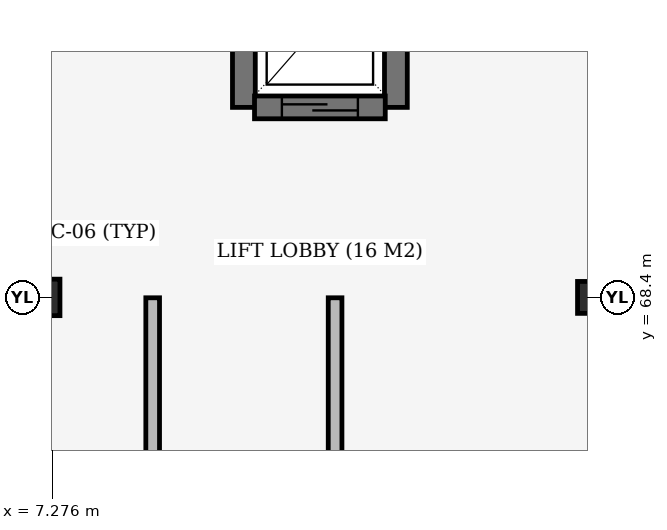
"""IFC4 building model, lengths in metres.
Left out: names, types, materials, properties, quantities, classifications, styles, units other than length and angle.
Written with IfcOpenShell. Run it as: python <this file> out.ifc"""

import sys

from ifc_helpers import new_model, si_unit, direction, frame, frame_2d, origin, origin_2d, place, context, subcontext, project, spatial, rectangle, extrude, element, fill, save


model = new_model("IFC4")
c1 = context("Model", 3, precision=1e-05, world=origin(), true_north=direction((0.0, 1.0)))
c2 = subcontext(c1, "Body", "Model", "MODEL_VIEW")
j1 = project(units=[si_unit("LENGTHUNIT", "METRE"), si_unit("PLANEANGLEUNIT", "RADIAN")], contexts=[c1])
p1 = place(None, origin())
s1 = spatial("IfcSite", under=j1, at=p1, CompositionType="ELEMENT")
p2 = place(p1, origin())
s2 = spatial("IfcBuilding", under=s1, at=p2, CompositionType="ELEMENT")
p3 = place(p2, frame((0.0, 0.0, 13.8)))
s3 = spatial("IfcBuildingStorey", under=s2, at=p3, CompositionType="ELEMENT", Elevation=13.8)
p4 = place(p3, frame((7.2, 68.4, 0.0), z_axis=(0.0, 0.0, 1.0), x_axis=(1.0, 0.0, 0.0)))
e1 = element("IfcColumn", 1, at=p4, inside=s3, PredefinedType="COLUMN", context=c2, shape_type="SweptSolid", body=[
    extrude(rectangle(XDim=0.36, YDim=0.48, at=origin_2d()), origin(), (0.0, 0.0, 1.0), 3.92),
])
p5 = place(p3, frame((14.4, 68.4, 0.0), z_axis=(0.0, 0.0, 1.0), x_axis=(1.0, 0.0, 0.0)))
e2 = element("IfcColumn", 2, at=p5, inside=s3, PredefinedType="COLUMN", context=c2, shape_type="SweptSolid", body=[
    extrude(rectangle(XDim=0.42, YDim=0.42, at=origin_2d()), origin(), (0.0, 0.0, 1.0), 3.92),
])
for number, where, z_axis, x_axis in (
    (3, (9.8, 73.1, 0.0), (0.0, 0.0, 1.0), (0.0, -1.0, 0.0)),
    (4, (11.8, 70.9, 0.0), (0.0, 0.0, 1.0), (0.0, 1.0, 0.0)),
):
    element("IfcWall", number, at=place(p3, frame(where, z_axis=z_axis, x_axis=x_axis)), inside=s3, PredefinedType="SHEAR", context=c2, shape_type="SweptSolid", body=[
        extrude(rectangle(XDim=2.2, YDim=0.3, at=frame_2d((1.1, 0.0))), origin(), (0.0, 0.0, 1.0), 3.92),
    ])
p6 = place(p3, frame((11.66, 70.9, 0.0), z_axis=(0.0, 0.0, 1.0), x_axis=(-1.0, 0.0, 0.0)))
e5 = element("IfcWall", 5, at=p6, inside=s3, PredefinedType="SHEAR", context=c2, shape_type="SweptSolid", body=[
    extrude(rectangle(XDim=1.72, YDim=0.3, at=frame_2d((0.86, 0.0))), origin(), (0.0, 0.0, 1.0), 3.92),
])
p7 = place(p6, frame((0.36, 0.0, 0.0)))
e6 = element("IfcOpeningElement", 6, at=p7, cuts=e5, PredefinedType="OPENING", context=c2, shape_type="SweptSolid", body=[
    extrude(rectangle(XDim=1.0, YDim=2.1, at=frame_2d((0.5, 1.05))), frame((0.0, 0.16, 0.0), z_axis=(0.0, -1.0, 0.0), x_axis=(1.0, 0.0, 0.0)), (0.0, 0.0, 1.0), 0.32),
])
p8 = place(p3, frame((8.6, 61.16, 0.0), z_axis=(0.0, 0.0, 1.0), x_axis=(0.0, 1.0, 0.0)))
e7 = element("IfcWall", 7, at=p8, inside=s3, PredefinedType="PARTITIONING", context=c2, shape_type="SweptSolid", body=[
    extrude(rectangle(XDim=7.235, YDim=0.18, at=frame_2d((3.618, 0.0))), origin(), (0.0, 0.0, 1.0), 3.18),
])
p9 = place(p8, frame((3.127, 0.0, 0.0)))
e8 = element("IfcOpeningElement", 8, at=p9, cuts=e7, PredefinedType="OPENING", context=c2, shape_type="SweptSolid", body=[
    extrude(rectangle(XDim=0.98, YDim=2.18, at=frame_2d((0.49, 1.09))), frame((0.0, 0.1, 0.0), z_axis=(0.0, -1.0, 0.0), x_axis=(1.0, 0.0, 0.0)), (0.0, 0.0, 1.0), 0.2),
])
p10 = place(p3, frame((11.0, 61.16, 0.0), z_axis=(0.0, 0.0, 1.0), x_axis=(0.0, 1.0, 0.0)))
e9 = element("IfcWall", 9, at=p10, inside=s3, PredefinedType="PARTITIONING", context=c2, shape_type="SweptSolid", body=[
    extrude(rectangle(XDim=7.235, YDim=0.18, at=frame_2d((3.618, 0.0))), origin(), (0.0, 0.0, 1.0), 3.18),
])
p11 = place(p10, frame((3.123, 0.0, 0.0)))
e10 = element("IfcOpeningElement", 10, at=p11, cuts=e9, PredefinedType="OPENING", context=c2, shape_type="SweptSolid", body=[
    extrude(rectangle(XDim=0.99, YDim=2.18, at=frame_2d((0.495, 1.09))), frame((0.0, 0.1, 0.0), z_axis=(0.0, -1.0, 0.0), x_axis=(1.0, 0.0, 0.0)), (0.0, 0.0, 1.0), 0.2),
])
p12 = place(p7, origin())
e11 = element("IfcDoor", 11, at=p12, inside=s3, OperationType="SLIDING_TO_LEFT", PredefinedType="DOOR", context=c2, shape_type="SweptSolid", body=[
    extrude(rectangle(XDim=1.0, YDim=2.1, at=frame_2d((0.5, 1.05))), frame((0.0, 0.025, 0.0), z_axis=(0.0, -1.0, 0.0), x_axis=(1.0, 0.0, 0.0)), (0.0, 0.0, 1.0), 0.05),
])
fill(e6, e11)
save(model, sys.argv[1])
